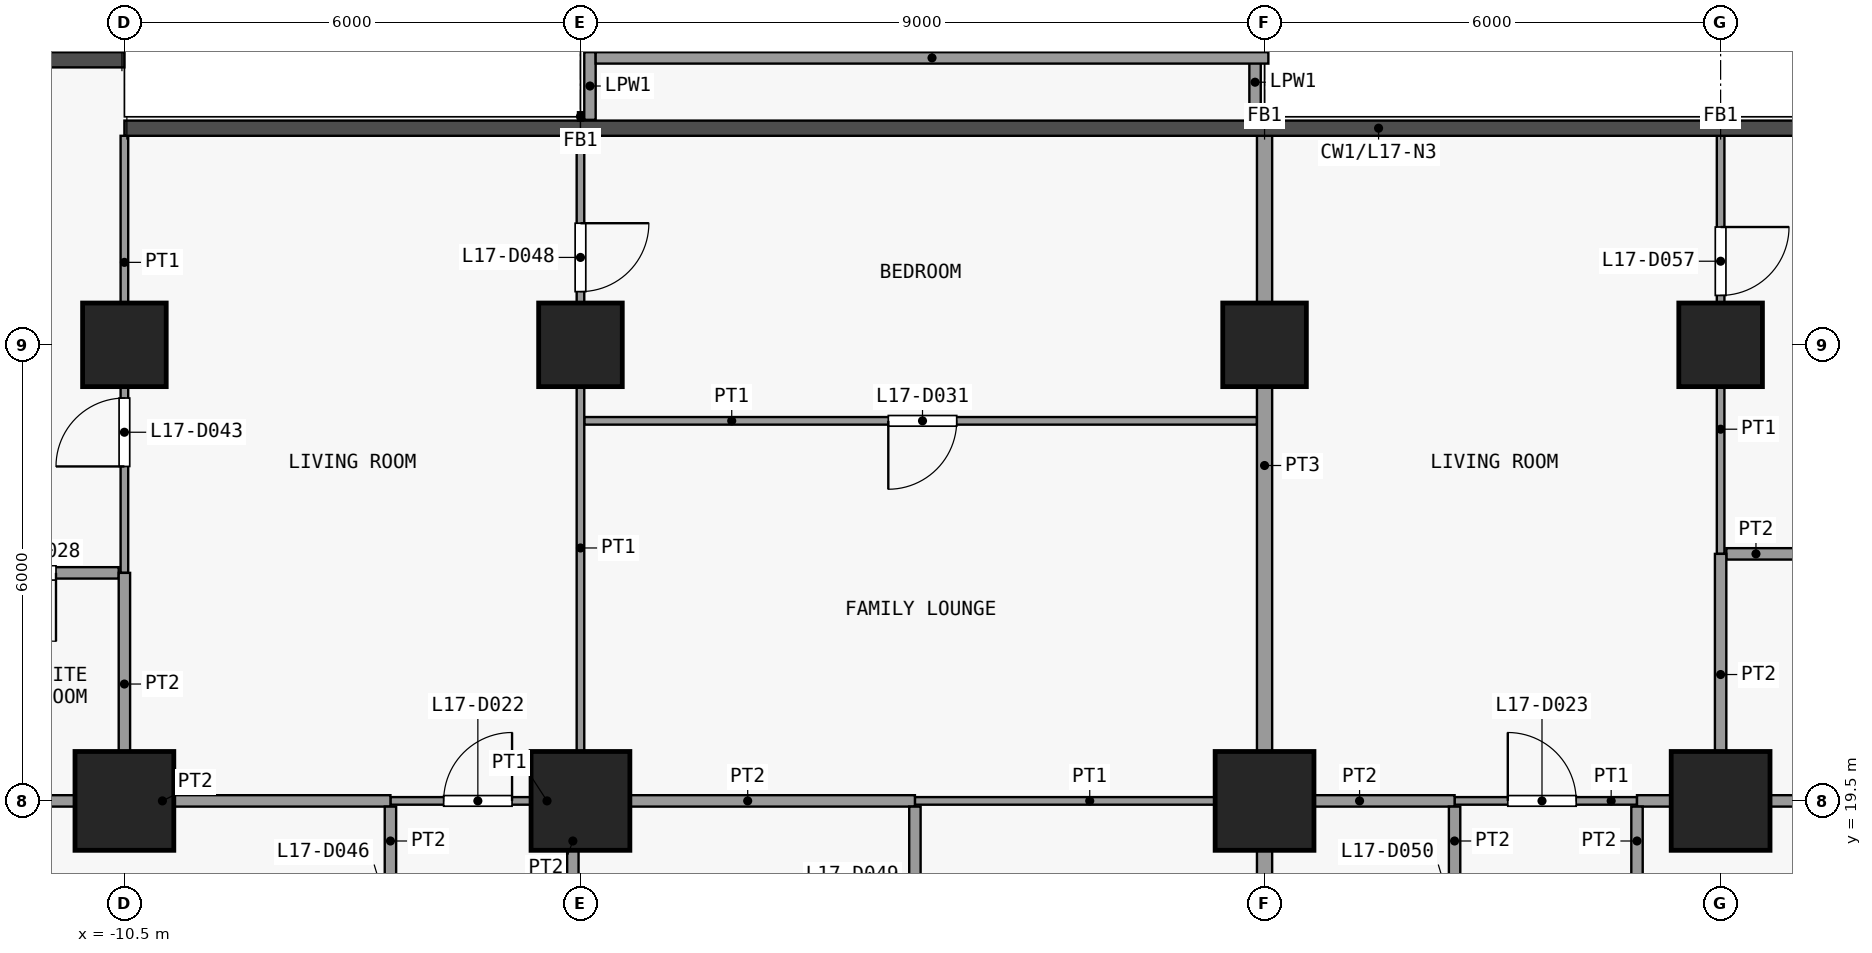
"""IFC4 building model, lengths in metres.
Left out: names, types, materials, properties, quantities, classifications, styles, units other than length and angle.
Written with IfcOpenShell. Run it as: python <this file> out.ifc"""

import sys

from ifc_helpers import new_model, si_unit, direction, frame, frame_2d, origin, origin_2d, place, context, subcontext, project, spatial, rectangle, extrude, element, fill, save


model = new_model("IFC4")
c1 = context("Model", 3, precision=1e-05, world=origin(), true_north=direction((0.0, 1.0)))
c2 = subcontext(c1, "Body", "Model", "MODEL_VIEW")
j1 = project(units=[si_unit("LENGTHUNIT", "METRE"), si_unit("PLANEANGLEUNIT", "RADIAN")], contexts=[c1])
p1 = place(None, origin())
s1 = spatial("IfcSite", under=j1, at=p1, CompositionType="ELEMENT")
p2 = place(p1, origin())
s2 = spatial("IfcBuilding", under=s1, at=p2, CompositionType="ELEMENT")
p3 = place(p2, frame((0.0, 0.0, 72.1)))
s3 = spatial("IfcBuildingStorey", under=s2, at=p3, CompositionType="ELEMENT", Elevation=72.1)
p4 = place(p3, frame((-10.5, 19.5, 0.0), z_axis=(0.0, 0.0, 1.0), x_axis=(1.0, 0.0, 0.0)))
e1 = element("IfcColumn", 1, at=p4, inside=s3, PredefinedType="COLUMN", context=c2, shape_type="SweptSolid", body=[
    extrude(rectangle(XDim=1.3, YDim=1.3, at=origin_2d()), origin(), (0.0, 0.0, 1.0), 3.6),
])
p5 = place(p3, frame((-10.5, 25.5, 0.0), z_axis=(0.0, 0.0, 1.0), x_axis=(1.0, 0.0, 0.0)))
e2 = element("IfcColumn", 2, at=p5, inside=s3, PredefinedType="COLUMN", context=c2, shape_type="SweptSolid", body=[
    extrude(rectangle(XDim=1.1, YDim=1.1, at=origin_2d()), origin(), (0.0, 0.0, 1.0), 3.6),
])
p6 = place(p3, frame((-4.5, 19.5, 0.0), z_axis=(0.0, 0.0, 1.0), x_axis=(1.0, 0.0, 0.0)))
e3 = element("IfcColumn", 3, at=p6, inside=s3, PredefinedType="COLUMN", context=c2, shape_type="SweptSolid", body=[
    extrude(rectangle(XDim=1.3, YDim=1.3, at=origin_2d()), origin(), (0.0, 0.0, 1.0), 3.6),
])
p7 = place(p3, frame((-4.5, 25.5, 0.0), z_axis=(0.0, 0.0, 1.0), x_axis=(1.0, 0.0, 0.0)))
e4 = element("IfcColumn", 4, at=p7, inside=s3, PredefinedType="COLUMN", context=c2, shape_type="SweptSolid", body=[
    extrude(rectangle(XDim=1.1, YDim=1.1, at=origin_2d()), origin(), (0.0, 0.0, 1.0), 3.6),
])
p8 = place(p3, frame((4.5, 19.5, 0.0), z_axis=(0.0, 0.0, 1.0), x_axis=(1.0, 0.0, 0.0)))
e5 = element("IfcColumn", 5, at=p8, inside=s3, PredefinedType="COLUMN", context=c2, shape_type="SweptSolid", body=[
    extrude(rectangle(XDim=1.3, YDim=1.3, at=origin_2d()), origin(), (0.0, 0.0, 1.0), 3.6),
])
p9 = place(p3, frame((4.5, 25.5, 0.0), z_axis=(0.0, 0.0, 1.0), x_axis=(1.0, 0.0, 0.0)))
e6 = element("IfcColumn", 6, at=p9, inside=s3, PredefinedType="COLUMN", context=c2, shape_type="SweptSolid", body=[
    extrude(rectangle(XDim=1.1, YDim=1.1, at=origin_2d()), origin(), (0.0, 0.0, 1.0), 3.6),
])
p10 = place(p3, frame((10.5, 19.5, 0.0), z_axis=(0.0, 0.0, 1.0), x_axis=(1.0, 0.0, 0.0)))
e7 = element("IfcColumn", 7, at=p10, inside=s3, PredefinedType="COLUMN", context=c2, shape_type="SweptSolid", body=[
    extrude(rectangle(XDim=1.3, YDim=1.3, at=origin_2d()), origin(), (0.0, 0.0, 1.0), 3.6),
])
p11 = place(p3, frame((10.5, 25.5, 0.0), z_axis=(0.0, 0.0, 1.0), x_axis=(1.0, 0.0, 0.0)))
e8 = element("IfcColumn", 8, at=p11, inside=s3, PredefinedType="COLUMN", context=c2, shape_type="SweptSolid", body=[
    extrude(rectangle(XDim=1.1, YDim=1.1, at=origin_2d()), origin(), (0.0, 0.0, 1.0), 3.6),
])
p12 = place(p3, frame((4.375, 29.45, 0.0), z_axis=(0.0, 0.0, 1.0), x_axis=(0.0, -1.0, 0.0)))
e9 = element("IfcWall", 9, at=p12, inside=s3, PredefinedType="PARAPET", context=c2, shape_type="SweptSolid", body=[
    extrude(rectangle(XDim=0.99, YDim=0.15, at=frame_2d((0.495, 0.0))), origin(), (0.0, 0.0, 1.0), 1.15),
])
p13 = place(p3, frame((-4.375, 28.46, 0.0), z_axis=(0.0, 0.0, 1.0), x_axis=(0.0, 1.0, 0.0)))
e10 = element("IfcWall", 10, at=p13, inside=s3, PredefinedType="PARAPET", context=c2, shape_type="SweptSolid", body=[
    extrude(rectangle(XDim=0.89, YDim=0.15, at=frame_2d((0.445, 0.0))), origin(), (0.0, 0.0, 1.0), 1.15),
])
p14 = place(p3, frame((-4.3, 29.275, 0.0), z_axis=(0.0, 0.0, 1.0), x_axis=(1.0, 0.0, 0.0)))
e11 = element("IfcWall", 11, at=p14, inside=s3, PredefinedType="PARAPET", context=c2, shape_type="SweptSolid", body=[
    extrude(rectangle(XDim=8.85, YDim=0.15, at=frame_2d((4.425, 0.0))), origin(), (0.0, 0.0, 1.0), 1.15),
])
p15 = place(p3, frame((-7.0, 19.5, 0.0), z_axis=(0.0, 0.0, 1.0), x_axis=(1.0, 0.0, 0.0)))
e12 = element("IfcWall", 12, at=p15, inside=s3, PredefinedType="PARTITIONING", context=c2, shape_type="SweptSolid", body=[
    extrude(rectangle(XDim=2.4, YDim=0.1, at=frame_2d((1.2, 0.0))), origin(), (0.0, 0.0, 1.0), 3.15),
])
p16 = place(p15, frame((0.7, 0.0, 0.0)))
e13 = element("IfcOpeningElement", 13, at=p16, cuts=e12, PredefinedType="OPENING", context=c2, shape_type="SweptSolid", body=[
    extrude(rectangle(XDim=0.9, YDim=2.1, at=frame_2d((0.45, 1.05))), frame((0.0, 0.06, 0.0), z_axis=(0.0, -1.0, 0.0), x_axis=(1.0, 0.0, 0.0)), (0.0, 0.0, 1.0), 0.12),
])
p17 = place(p3, frame((-0.1, 19.5, 0.0), z_axis=(0.0, 0.0, 1.0), x_axis=(1.0, 0.0, 0.0)))
e14 = element("IfcWall", 14, at=p17, inside=s3, PredefinedType="PARTITIONING", context=c2, shape_type="SweptSolid", body=[
    extrude(rectangle(XDim=4.6, YDim=0.1, at=frame_2d((2.3, 0.0))), origin(), (0.0, 0.0, 1.0), 3.15),
])
p18 = place(p3, frame((7.0, 19.5, 0.0), z_axis=(0.0, 0.0, 1.0), x_axis=(1.0, 0.0, 0.0)))
e15 = element("IfcWall", 15, at=p18, inside=s3, PredefinedType="PARTITIONING", context=c2, shape_type="SweptSolid", body=[
    extrude(rectangle(XDim=2.4, YDim=0.1, at=frame_2d((1.2, 0.0))), origin(), (0.0, 0.0, 1.0), 3.15),
])
p19 = place(p18, frame((0.7, 0.0, 0.0)))
e16 = element("IfcOpeningElement", 16, at=p19, cuts=e15, PredefinedType="OPENING", context=c2, shape_type="SweptSolid", body=[
    extrude(rectangle(XDim=0.9, YDim=2.1, at=frame_2d((0.45, 1.05))), frame((0.0, 0.06, 0.0), z_axis=(0.0, -1.0, 0.0), x_axis=(1.0, 0.0, 0.0)), (0.0, 0.0, 1.0), 0.12),
])
p20 = place(p3, frame((-13.0, 19.5, 0.0), z_axis=(0.0, 0.0, 1.0), x_axis=(1.0, 0.0, 0.0)))
e17 = element("IfcWall", 17, at=p20, inside=s3, PredefinedType="PARTITIONING", context=c2, shape_type="SweptSolid", body=[
    extrude(rectangle(XDim=6.0, YDim=0.15, at=frame_2d((3.0, 0.0))), origin(), (0.0, 0.0, 1.0), 3.15),
])
p21 = place(p3, frame((-4.5, 19.5, 0.0), z_axis=(0.0, 0.0, 1.0), x_axis=(1.0, 0.0, 0.0)))
e18 = element("IfcWall", 18, at=p21, inside=s3, PredefinedType="PARTITIONING", context=c2, shape_type="SweptSolid", body=[
    extrude(rectangle(XDim=4.4, YDim=0.15, at=frame_2d((2.2, 0.0))), origin(), (0.0, 0.0, 1.0), 3.15),
])
p22 = place(p3, frame((4.5, 19.5, 0.0), z_axis=(0.0, 0.0, 1.0), x_axis=(1.0, 0.0, 0.0)))
e19 = element("IfcWall", 19, at=p22, inside=s3, PredefinedType="PARTITIONING", context=c2, shape_type="SweptSolid", body=[
    extrude(rectangle(XDim=2.5, YDim=0.15, at=frame_2d((1.25, 0.0))), origin(), (0.0, 0.0, 1.0), 3.15),
])
p23 = place(p3, frame((9.4, 19.5, 0.0), z_axis=(0.0, 0.0, 1.0), x_axis=(1.0, 0.0, 0.0)))
e20 = element("IfcWall", 20, at=p23, inside=s3, PredefinedType="PARTITIONING", context=c2, shape_type="SweptSolid", body=[
    extrude(rectangle(XDim=9.6, YDim=0.15, at=frame_2d((4.8, 0.0))), origin(), (0.0, 0.0, 1.0), 3.15),
])
p24 = place(p3, frame((-13.2, 22.5, 0.0), z_axis=(0.0, 0.0, 1.0), x_axis=(1.0, 0.0, 0.0)))
e21 = element("IfcWall", 21, at=p24, inside=s3, PredefinedType="PARTITIONING", context=c2, shape_type="SweptSolid", body=[
    extrude(rectangle(XDim=2.625, YDim=0.15, at=frame_2d((1.312, 0.0))), origin(), (0.0, 0.0, 1.0), 3.15),
])
p25 = place(p24, frame((0.9, 0.0, 0.0)))
e22 = element("IfcOpeningElement", 22, at=p25, cuts=e21, PredefinedType="OPENING", context=c2, shape_type="SweptSolid", body=[
    extrude(rectangle(XDim=0.9, YDim=2.1, at=frame_2d((0.45, 1.05))), frame((0.0, 0.085, 0.0), z_axis=(0.0, -1.0, 0.0), x_axis=(1.0, 0.0, 0.0)), (0.0, 0.0, 1.0), 0.17),
])
p26 = place(p3, frame((10.575, 22.75, 0.0), z_axis=(0.0, 0.0, 1.0), x_axis=(1.0, 0.0, 0.0)))
e23 = element("IfcWall", 23, at=p26, inside=s3, PredefinedType="PARTITIONING", context=c2, shape_type="SweptSolid", body=[
    extrude(rectangle(XDim=2.625, YDim=0.15, at=frame_2d((1.312, 0.0))), origin(), (0.0, 0.0, 1.0), 3.15),
])
p27 = place(p26, frame((0.9, 0.0, 0.0)))
e24 = element("IfcOpeningElement", 24, at=p27, cuts=e23, PredefinedType="OPENING", context=c2, shape_type="SweptSolid", body=[
    extrude(rectangle(XDim=0.9, YDim=2.1, at=frame_2d((0.45, 1.05))), frame((0.0, 0.085, 0.0), z_axis=(0.0, -1.0, 0.0), x_axis=(1.0, 0.0, 0.0)), (0.0, 0.0, 1.0), 0.17),
])
p28 = place(p3, frame((-4.45, 24.5, 0.0), z_axis=(0.0, 0.0, 1.0), x_axis=(1.0, 0.0, 0.0)))
e25 = element("IfcWall", 25, at=p28, inside=s3, PredefinedType="PARTITIONING", context=c2, shape_type="SweptSolid", body=[
    extrude(rectangle(XDim=8.85, YDim=0.1, at=frame_2d((4.425, 0.0))), origin(), (0.0, 0.0, 1.0), 3.15),
])
p29 = place(p28, frame((4.0, 0.0, 0.0)))
e26 = element("IfcOpeningElement", 26, at=p29, cuts=e25, PredefinedType="OPENING", context=c2, shape_type="SweptSolid", body=[
    extrude(rectangle(XDim=0.9, YDim=2.1, at=frame_2d((0.45, 1.05))), frame((0.0, 0.06, 0.0), z_axis=(0.0, -1.0, 0.0), x_axis=(1.0, 0.0, 0.0)), (0.0, 0.0, 1.0), 0.12),
])
p30 = place(p3, frame((-10.5, 22.5, 0.0), z_axis=(0.0, 0.0, 1.0), x_axis=(0.0, 1.0, 0.0)))
e27 = element("IfcWall", 27, at=p30, inside=s3, PredefinedType="PARTITIONING", context=c2, shape_type="SweptSolid", body=[
    extrude(rectangle(XDim=5.75, YDim=0.1, at=frame_2d((2.875, 0.0))), origin(), (0.0, 0.0, 1.0), 3.15),
])
p31 = place(p30, frame((1.4, 0.0, 0.0)))
e28 = element("IfcOpeningElement", 28, at=p31, cuts=e27, PredefinedType="OPENING", context=c2, shape_type="SweptSolid", body=[
    extrude(rectangle(XDim=0.9, YDim=2.1, at=frame_2d((0.45, 1.05))), frame((0.0, 0.06, 0.0), z_axis=(0.0, -1.0, 0.0), x_axis=(1.0, 0.0, 0.0)), (0.0, 0.0, 1.0), 0.12),
])
p32 = place(p3, frame((-10.5, 19.575, 0.0), z_axis=(0.0, 0.0, 1.0), x_axis=(0.0, 1.0, 0.0)))
e29 = element("IfcWall", 29, at=p32, inside=s3, PredefinedType="PARTITIONING", context=c2, shape_type="SweptSolid", body=[
    extrude(rectangle(XDim=2.925, YDim=0.15, at=frame_2d((1.462, 0.0))), origin(), (0.0, 0.0, 1.0), 3.15),
])
p33 = place(p3, frame((-7.0, 16.6, 0.0), z_axis=(0.0, 0.0, 1.0), x_axis=(0.0, 1.0, 0.0)))
e30 = element("IfcWall", 30, at=p33, inside=s3, PredefinedType="PARTITIONING", context=c2, shape_type="SweptSolid", body=[
    extrude(rectangle(XDim=2.825, YDim=0.15, at=frame_2d((1.413, 0.0))), origin(), (0.0, 0.0, 1.0), 3.15),
])
p34 = place(p33, frame((0.9, 0.0, 0.0)))
e31 = element("IfcOpeningElement", 31, at=p34, cuts=e30, PredefinedType="OPENING", context=c2, shape_type="SweptSolid", body=[
    extrude(rectangle(XDim=0.9, YDim=2.1, at=frame_2d((0.45, 1.05))), frame((0.0, 0.085, 0.0), z_axis=(0.0, -1.0, 0.0), x_axis=(1.0, 0.0, 0.0)), (0.0, 0.0, 1.0), 0.17),
])
p35 = place(p3, frame((-4.6, 16.6, 0.0), z_axis=(0.0, 0.0, 1.0), x_axis=(0.0, 1.0, 0.0)))
e32 = element("IfcWall", 32, at=p35, inside=s3, PredefinedType="PARTITIONING", context=c2, shape_type="SweptSolid", body=[
    extrude(rectangle(XDim=2.825, YDim=0.15, at=frame_2d((1.413, 0.0))), origin(), (0.0, 0.0, 1.0), 3.15),
])
p36 = place(p35, frame((0.9, 0.0, 0.0)))
e33 = element("IfcOpeningElement", 33, at=p36, cuts=e32, PredefinedType="OPENING", context=c2, shape_type="SweptSolid", body=[
    extrude(rectangle(XDim=0.9, YDim=2.1, at=frame_2d((0.45, 1.05))), frame((0.0, 0.085, 0.0), z_axis=(0.0, -1.0, 0.0), x_axis=(1.0, 0.0, 0.0)), (0.0, 0.0, 1.0), 0.17),
])
p37 = place(p3, frame((-4.5, 19.575, 0.0), z_axis=(0.0, 0.0, 1.0), x_axis=(0.0, 1.0, 0.0)))
e34 = element("IfcWall", 34, at=p37, inside=s3, PredefinedType="PARTITIONING", context=c2, shape_type="SweptSolid", body=[
    extrude(rectangle(XDim=8.675, YDim=0.1, at=frame_2d((4.337, 0.0))), origin(), (0.0, 0.0, 1.0), 3.15),
])
p38 = place(p37, frame((6.625, 0.0, 0.0)))
e35 = element("IfcOpeningElement", 35, at=p38, cuts=e34, PredefinedType="OPENING", context=c2, shape_type="SweptSolid", body=[
    extrude(rectangle(XDim=0.9, YDim=2.1, at=frame_2d((0.45, 1.05))), frame((0.0, 0.06, 0.0), z_axis=(0.0, -1.0, 0.0), x_axis=(1.0, 0.0, 0.0)), (0.0, 0.0, 1.0), 0.12),
])
p39 = place(p3, frame((-0.1, 16.6, 0.0), z_axis=(0.0, 0.0, 1.0), x_axis=(0.0, 1.0, 0.0)))
e36 = element("IfcWall", 36, at=p39, inside=s3, PredefinedType="PARTITIONING", context=c2, shape_type="SweptSolid", body=[
    extrude(rectangle(XDim=2.825, YDim=0.15, at=frame_2d((1.413, 0.0))), origin(), (0.0, 0.0, 1.0), 3.15),
])
p40 = place(p39, frame((1.0, 0.0, 0.0)))
e37 = element("IfcOpeningElement", 37, at=p40, cuts=e36, PredefinedType="OPENING", context=c2, shape_type="SweptSolid", body=[
    extrude(rectangle(XDim=0.9, YDim=2.1, at=frame_2d((0.45, 1.05))), frame((0.0, 0.085, 0.0), z_axis=(0.0, -1.0, 0.0), x_axis=(1.0, 0.0, 0.0)), (0.0, 0.0, 1.0), 0.17),
])
p41 = place(p3, frame((4.5, 16.6, 0.0), z_axis=(0.0, 0.0, 1.0), x_axis=(0.0, 1.0, 0.0)))
e38 = element("IfcWall", 38, at=p41, inside=s3, PredefinedType="PARTITIONING", context=c2, shape_type="SweptSolid", body=[
    extrude(rectangle(XDim=2.825, YDim=0.2, at=frame_2d((1.413, 0.0))), origin(), (0.0, 0.0, 1.0), 3.15),
])
p42 = place(p3, frame((4.5, 19.575, 0.0), z_axis=(0.0, 0.0, 1.0), x_axis=(0.0, 1.0, 0.0)))
e39 = element("IfcWall", 39, at=p42, inside=s3, PredefinedType="PARTITIONING", context=c2, shape_type="SweptSolid", body=[
    extrude(rectangle(XDim=8.675, YDim=0.2, at=frame_2d((4.337, 0.0))), origin(), (0.0, 0.0, 1.0), 3.15),
])
p43 = place(p3, frame((7.0, 16.6, 0.0), z_axis=(0.0, 0.0, 1.0), x_axis=(0.0, 1.0, 0.0)))
e40 = element("IfcWall", 40, at=p43, inside=s3, PredefinedType="PARTITIONING", context=c2, shape_type="SweptSolid", body=[
    extrude(rectangle(XDim=2.825, YDim=0.15, at=frame_2d((1.413, 0.0))), origin(), (0.0, 0.0, 1.0), 3.15),
])
p44 = place(p43, frame((0.9, 0.0, 0.0)))
e41 = element("IfcOpeningElement", 41, at=p44, cuts=e40, PredefinedType="OPENING", context=c2, shape_type="SweptSolid", body=[
    extrude(rectangle(XDim=0.9, YDim=2.1, at=frame_2d((0.45, 1.05))), frame((0.0, 0.085, 0.0), z_axis=(0.0, -1.0, 0.0), x_axis=(1.0, 0.0, 0.0)), (0.0, 0.0, 1.0), 0.17),
])
p45 = place(p3, frame((9.4, 16.6, 0.0), z_axis=(0.0, 0.0, 1.0), x_axis=(0.0, 1.0, 0.0)))
e42 = element("IfcWall", 42, at=p45, inside=s3, PredefinedType="PARTITIONING", context=c2, shape_type="SweptSolid", body=[
    extrude(rectangle(XDim=2.825, YDim=0.15, at=frame_2d((1.413, 0.0))), origin(), (0.0, 0.0, 1.0), 3.15),
])
p46 = place(p45, frame((0.9, 0.0, 0.0)))
e43 = element("IfcOpeningElement", 43, at=p46, cuts=e42, PredefinedType="OPENING", context=c2, shape_type="SweptSolid", body=[
    extrude(rectangle(XDim=0.9, YDim=2.1, at=frame_2d((0.45, 1.05))), frame((0.0, 0.085, 0.0), z_axis=(0.0, -1.0, 0.0), x_axis=(1.0, 0.0, 0.0)), (0.0, 0.0, 1.0), 0.17),
])
p47 = place(p3, frame((10.5, 22.75, 0.0), z_axis=(0.0, 0.0, 1.0), x_axis=(0.0, 1.0, 0.0)))
e44 = element("IfcWall", 44, at=p47, inside=s3, PredefinedType="PARTITIONING", context=c2, shape_type="SweptSolid", body=[
    extrude(rectangle(XDim=5.5, YDim=0.1, at=frame_2d((2.75, 0.0))), origin(), (0.0, 0.0, 1.0), 3.15),
])
p48 = place(p47, frame((3.4, 0.0, 0.0)))
e45 = element("IfcOpeningElement", 45, at=p48, cuts=e44, PredefinedType="OPENING", context=c2, shape_type="SweptSolid", body=[
    extrude(rectangle(XDim=0.9, YDim=2.1, at=frame_2d((0.45, 1.05))), frame((0.0, 0.06, 0.0), z_axis=(0.0, -1.0, 0.0), x_axis=(1.0, 0.0, 0.0)), (0.0, 0.0, 1.0), 0.12),
])
p49 = place(p3, frame((10.5, 19.575, 0.0), z_axis=(0.0, 0.0, 1.0), x_axis=(0.0, 1.0, 0.0)))
e46 = element("IfcWall", 46, at=p49, inside=s3, PredefinedType="PARTITIONING", context=c2, shape_type="SweptSolid", body=[
    extrude(rectangle(XDim=3.175, YDim=0.15, at=frame_2d((1.587, 0.0))), origin(), (0.0, 0.0, 1.0), 3.15),
])
p50 = place(p16, origin())
e47 = element("IfcDoor", 47, at=p50, inside=s3, OperationType="SINGLE_SWING_LEFT", PredefinedType="DOOR", context=c2, shape_type="SweptSolid", body=[
    extrude(rectangle(XDim=0.9, YDim=2.1, at=frame_2d((0.45, 1.05))), frame((0.0, 0.025, 0.0), z_axis=(0.0, -1.0, 0.0), x_axis=(1.0, 0.0, 0.0)), (0.0, 0.0, 1.0), 0.05),
])
fill(e13, e47)
p51 = place(p19, origin())
e48 = element("IfcDoor", 48, at=p51, inside=s3, OperationType="SINGLE_SWING_RIGHT", PredefinedType="DOOR", context=c2, shape_type="SweptSolid", body=[
    extrude(rectangle(XDim=0.9, YDim=2.1, at=frame_2d((0.45, 1.05))), frame((0.0, 0.025, 0.0), z_axis=(0.0, -1.0, 0.0), x_axis=(1.0, 0.0, 0.0)), (0.0, 0.0, 1.0), 0.05),
])
fill(e16, e48)
p52 = place(p25, origin())
e49 = element("IfcDoor", 49, at=p52, inside=s3, OperationType="SINGLE_SWING_RIGHT", PredefinedType="DOOR", context=c2, shape_type="SweptSolid", body=[
    extrude(rectangle(XDim=0.9, YDim=2.1, at=frame_2d((0.45, 1.05))), frame((0.0, 0.025, 0.0), z_axis=(0.0, -1.0, 0.0), x_axis=(1.0, 0.0, 0.0)), (0.0, 0.0, 1.0), 0.05),
])
fill(e22, e49)
p53 = place(p29, origin())
e50 = element("IfcDoor", 50, at=p53, inside=s3, OperationType="SINGLE_SWING_LEFT", PredefinedType="DOOR", context=c2, shape_type="SweptSolid", body=[
    extrude(rectangle(XDim=0.9, YDim=2.1, at=frame_2d((0.45, 1.05))), frame((0.0, 0.025, 0.0), z_axis=(0.0, -1.0, 0.0), x_axis=(1.0, 0.0, 0.0)), (0.0, 0.0, 1.0), 0.05),
])
fill(e26, e50)
p54 = place(p31, origin())
e51 = element("IfcDoor", 51, at=p54, inside=s3, OperationType="SINGLE_SWING_RIGHT", PredefinedType="DOOR", context=c2, shape_type="SweptSolid", body=[
    extrude(rectangle(XDim=0.9, YDim=2.1, at=frame_2d((0.45, 1.05))), frame((0.0, 0.025, 0.0), z_axis=(0.0, -1.0, 0.0), x_axis=(1.0, 0.0, 0.0)), (0.0, 0.0, 1.0), 0.05),
])
fill(e28, e51)
p55 = place(p38, origin())
e52 = element("IfcDoor", 52, at=p55, inside=s3, OperationType="SINGLE_SWING_RIGHT", PredefinedType="DOOR", context=c2, shape_type="SweptSolid", body=[
    extrude(rectangle(XDim=0.9, YDim=2.1, at=frame_2d((0.45, 1.05))), frame((0.0, 0.025, 0.0), z_axis=(0.0, -1.0, 0.0), x_axis=(1.0, 0.0, 0.0)), (0.0, 0.0, 1.0), 0.05),
])
fill(e35, e52)
p56 = place(p48, origin())
e53 = element("IfcDoor", 53, at=p56, inside=s3, OperationType="SINGLE_SWING_RIGHT", PredefinedType="DOOR", context=c2, shape_type="SweptSolid", body=[
    extrude(rectangle(XDim=0.9, YDim=2.1, at=frame_2d((0.45, 1.05))), frame((0.0, 0.025, 0.0), z_axis=(0.0, -1.0, 0.0), x_axis=(1.0, 0.0, 0.0)), (0.0, 0.0, 1.0), 0.05),
])
fill(e45, e53)
save(model, sys.argv[1])
